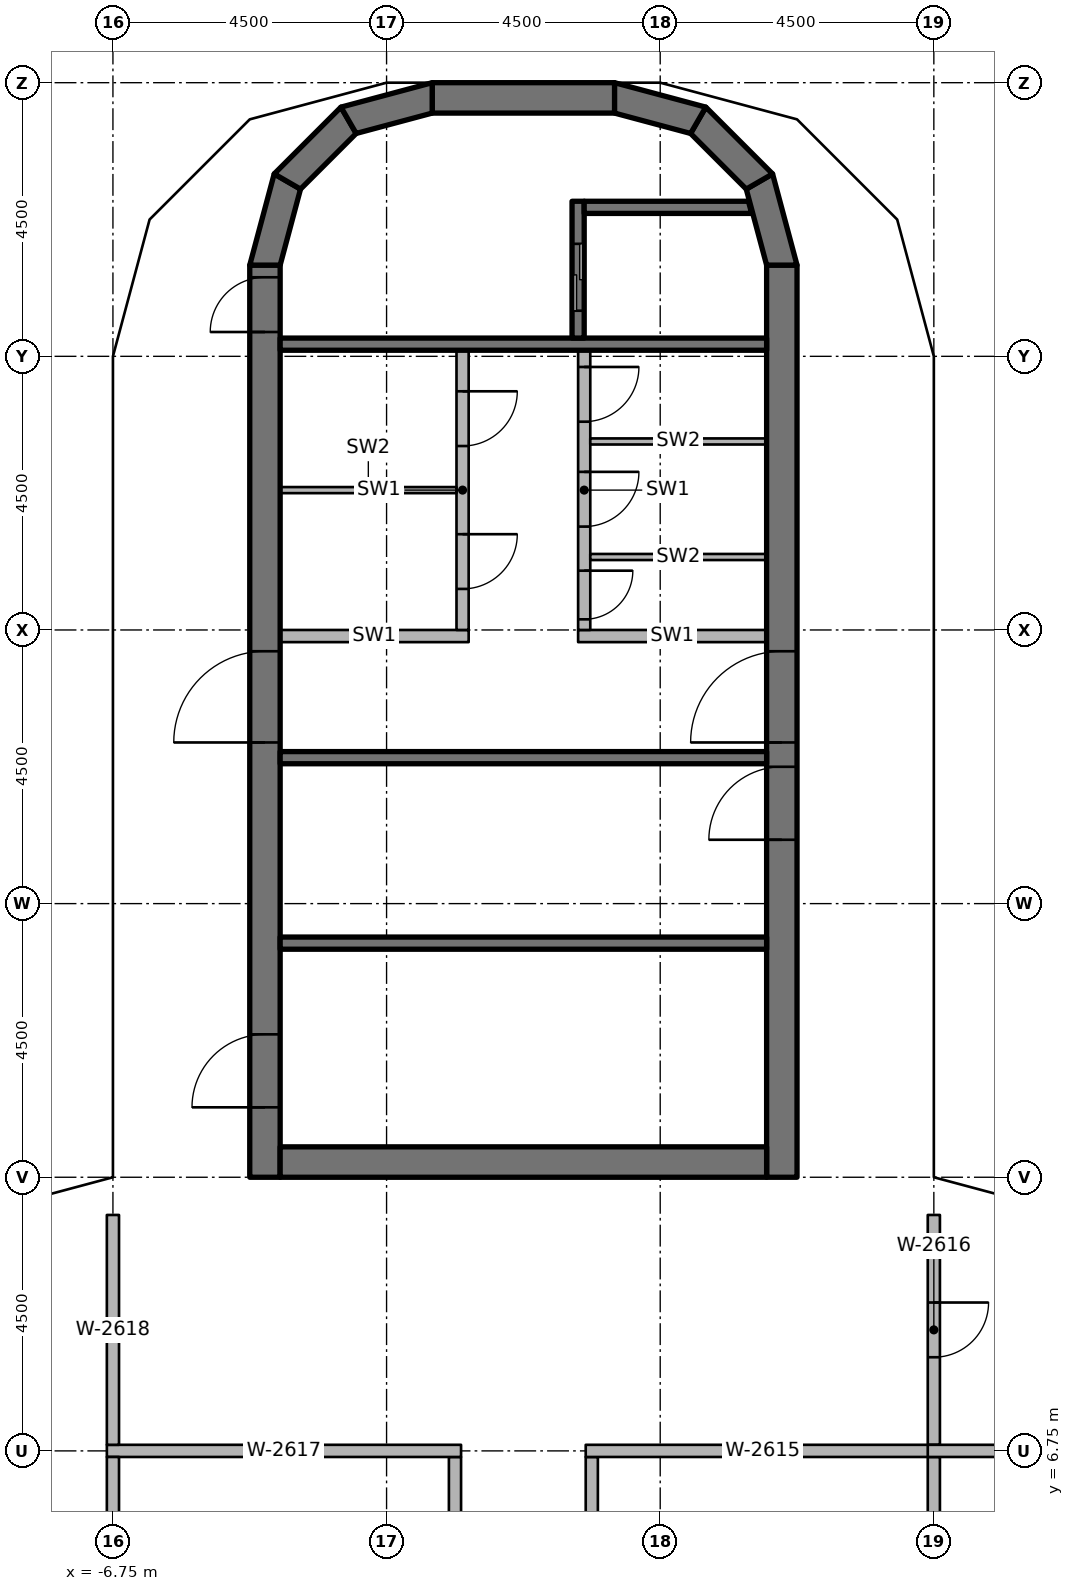
"""IFC4 building model, lengths in metres.
Left out: names, types, materials, properties, quantities, classifications, styles, units other than length and angle.
Written with IfcOpenShell. Run it as: python <this file> out.ifc"""

import sys

from ifc_helpers import new_model, si_unit, direction, frame, frame_2d, origin, origin_2d, place, context, subcontext, project, spatial, polyline, rectangle, outline, extrude, element, fill, save


model = new_model("IFC4")
c1 = context("Model", 3, precision=1e-05, world=origin(), true_north=direction((0.0, 1.0)))
c2 = subcontext(c1, "Body", "Model", "MODEL_VIEW")
j1 = project(units=[si_unit("LENGTHUNIT", "METRE"), si_unit("PLANEANGLEUNIT", "RADIAN")], contexts=[c1])
p1 = place(None, origin())
s1 = spatial("IfcSite", under=j1, at=p1, CompositionType="ELEMENT")
p2 = place(p1, origin())
s2 = spatial("IfcBuilding", under=s1, at=p2, CompositionType="ELEMENT")
p3 = place(p2, frame((0.0, 0.0, 249.8)))
s3 = spatial("IfcBuildingStorey", under=s2, at=p3, CompositionType="ELEMENT", Elevation=249.8)
for number, where, z_axis, x_axis in (
    (1, (-6.25, 6.25, 0.0), (0.0, 0.0, 1.0), (1.0, 0.0, 0.0)),
    (2, (-6.25, 10.75, 0.0), (0.0, 0.0, 1.0), (1.0, 0.0, 0.0)),
    (3, (-6.25, 15.75, 0.0), (0.0, 0.0, 1.0), (1.0, 0.0, 0.0)),
    (4, (-6.25, 20.25, 0.0), (0.0, 0.0, 1.0), (1.0, 0.0, 0.0)),
    (5, (-6.25, 24.65, 0.0), (0.0, 0.0, 1.0), (1.0, 0.0, 0.0)),
    (6, (6.25, 6.25, 0.0), (0.0, 0.0, 1.0), (1.0, 0.0, 0.0)),
    (7, (6.25, 10.75, 0.0), (0.0, 0.0, 1.0), (1.0, 0.0, 0.0)),
    (8, (6.25, 15.75, 0.0), (0.0, 0.0, 1.0), (1.0, 0.0, 0.0)),
    (9, (6.25, 20.25, 0.0), (0.0, 0.0, 1.0), (1.0, 0.0, 0.0)),
    (10, (6.25, 24.65, 0.0), (0.0, 0.0, 1.0), (1.0, 0.0, 0.0)),
):
    element("IfcColumn", number, at=place(p3, frame(where, z_axis=z_axis, x_axis=x_axis)), inside=s3, PredefinedType="COLUMN", context=c2, shape_type="SweptSolid", body=[
        extrude(rectangle(XDim=0.6, YDim=0.6, at=origin_2d()), origin(), (0.0, 0.0, 1.0), 3.65),
    ])
p4 = place(p3, frame((-4.25, 11.25, 0.0), z_axis=(0.0, 0.0, 1.0), x_axis=(0.0, 1.0, 0.0)))
e11 = element("IfcWall", 11, at=p4, inside=s3, PredefinedType="SHEAR", context=c2, shape_type="SweptSolid", body=[
    extrude(rectangle(XDim=15.0, YDim=0.5, at=frame_2d((7.5, 0.0))), origin(), (0.0, 0.0, 1.0), 3.8),
])
p5 = place(p4, frame((7.15, 0.0, 0.0)))
e12 = element("IfcOpeningElement", 12, at=p5, cuts=e11, PredefinedType="OPENING", context=c2, shape_type="SweptSolid", body=[
    extrude(rectangle(XDim=1.5, YDim=2.3, at=frame_2d((0.75, 1.15))), frame((0.0, 0.26, 0.0), z_axis=(0.0, -1.0, 0.0), x_axis=(1.0, 0.0, 0.0)), (0.0, 0.0, 1.0), 0.52),
])
p6 = place(p4, frame((13.9, 0.0, 0.0)))
e13 = element("IfcOpeningElement", 13, at=p6, cuts=e11, PredefinedType="OPENING", context=c2, shape_type="SweptSolid", body=[
    extrude(rectangle(XDim=0.9, YDim=2.1, at=frame_2d((0.45, 1.05))), frame((0.0, 0.26, 0.0), z_axis=(0.0, -1.0, 0.0), x_axis=(1.0, 0.0, 0.0)), (0.0, 0.0, 1.0), 0.52),
])
p7 = place(p4, frame((1.15, 0.0, 0.0)))
e14 = element("IfcOpeningElement", 14, at=p7, cuts=e11, PredefinedType="OPENING", context=c2, shape_type="SweptSolid", body=[
    extrude(rectangle(XDim=1.2, YDim=2.1, at=frame_2d((0.6, 1.05))), frame((0.0, 0.26, 0.0), z_axis=(0.0, -1.0, 0.0), x_axis=(1.0, 0.0, 0.0)), (0.0, 0.0, 1.0), 0.52),
])
p8 = place(p3, frame((4.25, 11.25, 0.0), z_axis=(0.0, 0.0, 1.0), x_axis=(0.0, 1.0, 0.0)))
e15 = element("IfcWall", 15, at=p8, inside=s3, PredefinedType="SHEAR", context=c2, shape_type="SweptSolid", body=[
    extrude(rectangle(XDim=15.0, YDim=0.5, at=frame_2d((7.5, 0.0))), origin(), (0.0, 0.0, 1.0), 3.8),
])
p9 = place(p8, frame((7.15, 0.0, 0.0)))
e16 = element("IfcOpeningElement", 16, at=p9, cuts=e15, PredefinedType="OPENING", context=c2, shape_type="SweptSolid", body=[
    extrude(rectangle(XDim=1.5, YDim=2.3, at=frame_2d((0.75, 1.15))), frame((0.0, 0.26, 0.0), z_axis=(0.0, -1.0, 0.0), x_axis=(1.0, 0.0, 0.0)), (0.0, 0.0, 1.0), 0.52),
])
p10 = place(p8, frame((5.55, 0.0, 0.0)))
e17 = element("IfcOpeningElement", 17, at=p10, cuts=e15, PredefinedType="OPENING", context=c2, shape_type="SweptSolid", body=[
    extrude(rectangle(XDim=1.2, YDim=2.1, at=frame_2d((0.6, 1.05))), frame((0.0, 0.26, 0.0), z_axis=(0.0, -1.0, 0.0), x_axis=(1.0, 0.0, 0.0)), (0.0, 0.0, 1.0), 0.52),
])
p11 = place(p3, frame((-4.0, 11.5, 0.0), z_axis=(0.0, 0.0, 1.0), x_axis=(1.0, 0.0, 0.0)))
e18 = element("IfcWall", 18, at=p11, inside=s3, PredefinedType="SHEAR", context=c2, shape_type="SweptSolid", body=[
    extrude(rectangle(XDim=8.0, YDim=0.5, at=frame_2d((4.0, 0.0))), origin(), (0.0, 0.0, 1.0), 3.8),
])
p12 = place(p3, frame((-1.5, 29.0, 0.0), z_axis=(0.0, 0.0, 1.0), x_axis=(1.0, 0.0, 0.0)))
e19 = element("IfcWall", 19, at=p12, inside=s3, PredefinedType="SHEAR", context=c2, shape_type="SweptSolid", body=[
    extrude(rectangle(XDim=3.0, YDim=0.5, at=frame_2d((1.5, 0.0))), origin(), (0.0, 0.0, 1.0), 3.8),
])
p13 = place(p3, origin())
e20 = element("IfcWall", 20, at=p13, inside=s3, PredefinedType="SHEAR", context=c2, shape_type="SweptSolid", body=[
    extrude(outline(polyline([(-4.5, 26.25), (-4.098, 27.75), (-3.665, 27.5), (-4.0, 26.25), (-4.5, 26.25)])), origin(), (0.0, 0.0, 1.0), 3.8),
])
p14 = place(p3, origin())
e21 = element("IfcWall", 21, at=p14, inside=s3, PredefinedType="SHEAR", context=c2, shape_type="SweptSolid", body=[
    extrude(outline(polyline([(-4.098, 27.75), (-3.0, 28.848), (-2.75, 28.415), (-3.665, 27.5), (-4.098, 27.75)])), origin(), (0.0, 0.0, 1.0), 3.8),
])
p15 = place(p3, origin())
e22 = element("IfcWall", 22, at=p15, inside=s3, PredefinedType="SHEAR", context=c2, shape_type="SweptSolid", body=[
    extrude(outline(polyline([(-3.0, 28.848), (-1.5, 29.25), (-1.5, 28.75), (-2.75, 28.415), (-3.0, 28.848)])), origin(), (0.0, 0.0, 1.0), 3.8),
])
p16 = place(p3, origin())
e23 = element("IfcWall", 23, at=p16, inside=s3, PredefinedType="SHEAR", context=c2, shape_type="SweptSolid", body=[
    extrude(outline(polyline([(4.5, 26.25), (4.098, 27.75), (3.665, 27.5), (4.0, 26.25), (4.5, 26.25)])), origin(), (0.0, 0.0, 1.0), 3.8),
])
p17 = place(p3, origin())
e24 = element("IfcWall", 24, at=p17, inside=s3, PredefinedType="SHEAR", context=c2, shape_type="SweptSolid", body=[
    extrude(outline(polyline([(4.098, 27.75), (3.0, 28.848), (2.75, 28.415), (3.665, 27.5), (4.098, 27.75)])), origin(), (0.0, 0.0, 1.0), 3.8),
])
p18 = place(p3, origin())
e25 = element("IfcWall", 25, at=p18, inside=s3, PredefinedType="SHEAR", context=c2, shape_type="SweptSolid", body=[
    extrude(outline(polyline([(3.0, 28.848), (1.5, 29.25), (1.5, 28.75), (2.75, 28.415), (3.0, 28.848)])), origin(), (0.0, 0.0, 1.0), 3.8),
])
p19 = place(p3, frame((-4.0, 24.95, 0.0), z_axis=(0.0, 0.0, 1.0), x_axis=(1.0, 0.0, 0.0)))
e26 = element("IfcWall", 26, at=p19, inside=s3, PredefinedType="SHEAR", context=c2, shape_type="SweptSolid", body=[
    extrude(rectangle(XDim=8.0, YDim=0.2, at=frame_2d((4.0, 0.0))), origin(), (0.0, 0.0, 1.0), 3.65),
])
p20 = place(p3, frame((0.9, 27.3, 0.0), z_axis=(0.0, 0.0, 1.0), x_axis=(0.0, -1.0, 0.0)))
e27 = element("IfcWall", 27, at=p20, inside=s3, PredefinedType="SHEAR", context=c2, shape_type="SweptSolid", body=[
    extrude(rectangle(XDim=2.25, YDim=0.2, at=frame_2d((1.125, 0.0))), origin(), (0.0, 0.0, 1.0), 3.65),
])
p21 = place(p20, frame((0.7, 0.0, 0.0)))
e28 = element("IfcOpeningElement", 28, at=p21, cuts=e27, PredefinedType="OPENING", context=c2, shape_type="SweptSolid", body=[
    extrude(rectangle(XDim=1.1, YDim=2.3, at=frame_2d((0.55, 1.15))), frame((0.0, 0.11, 0.0), z_axis=(0.0, -1.0, 0.0), x_axis=(1.0, 0.0, 0.0)), (0.0, 0.0, 1.0), 0.22),
])
p22 = place(p3, origin())
e29 = element("IfcWall", 29, at=p22, inside=s3, PredefinedType="SHEAR", context=c2, shape_type="SweptSolid", body=[
    extrude(outline(polyline([(1.0, 27.1), (3.755, 27.1), (3.701, 27.3), (1.0, 27.3), (1.0, 27.1)])), origin(), (0.0, 0.0, 1.0), 3.65),
])
for number, where, z_axis, x_axis in (
    (30, (-4.0, 18.15, 0.0), (0.0, 0.0, 1.0), (1.0, 0.0, 0.0)),
    (31, (-4.0, 15.1, 0.0), (0.0, 0.0, 1.0), (1.0, 0.0, 0.0)),
):
    element("IfcWall", number, at=place(p3, frame(where, z_axis=z_axis, x_axis=x_axis)), inside=s3, PredefinedType="SHEAR", context=c2, shape_type="SweptSolid", body=[
        extrude(rectangle(XDim=8.0, YDim=0.2, at=frame_2d((4.0, 0.0))), origin(), (0.0, 0.0, 1.0), 3.65),
    ])
p23 = place(p3, frame((-4.0, 20.15, 0.0), z_axis=(0.0, 0.0, 1.0), x_axis=(1.0, 0.0, 0.0)))
e32 = element("IfcWall", 32, at=p23, inside=s3, PredefinedType="PARTITIONING", context=c2, shape_type="SweptSolid", body=[
    extrude(rectangle(XDim=3.1, YDim=0.2, at=frame_2d((1.55, 0.0))), origin(), (0.0, 0.0, 1.0), 3.65),
])
p24 = place(p3, frame((-1.0, 24.85, 0.0), z_axis=(0.0, 0.0, 1.0), x_axis=(0.0, -1.0, 0.0)))
e33 = element("IfcWall", 33, at=p24, inside=s3, PredefinedType="PARTITIONING", context=c2, shape_type="SweptSolid", body=[
    extrude(rectangle(XDim=4.6, YDim=0.2, at=frame_2d((2.3, 0.0))), origin(), (0.0, 0.0, 1.0), 3.65),
])
p25 = place(p24, frame((0.675, 0.0, 0.0)))
e34 = element("IfcOpeningElement", 34, at=p25, cuts=e33, PredefinedType="OPENING", context=c2, shape_type="SweptSolid", body=[
    extrude(rectangle(XDim=0.9, YDim=2.1, at=frame_2d((0.45, 1.05))), frame((0.0, 0.11, 0.0), z_axis=(0.0, -1.0, 0.0), x_axis=(1.0, 0.0, 0.0)), (0.0, 0.0, 1.0), 0.22),
])
p26 = place(p24, frame((3.025, 0.0, 0.0)))
e35 = element("IfcOpeningElement", 35, at=p26, cuts=e33, PredefinedType="OPENING", context=c2, shape_type="SweptSolid", body=[
    extrude(rectangle(XDim=0.9, YDim=2.1, at=frame_2d((0.45, 1.05))), frame((0.0, 0.11, 0.0), z_axis=(0.0, -1.0, 0.0), x_axis=(1.0, 0.0, 0.0)), (0.0, 0.0, 1.0), 0.22),
])
p27 = place(p3, frame((0.9, 20.15, 0.0), z_axis=(0.0, 0.0, 1.0), x_axis=(1.0, 0.0, 0.0)))
e36 = element("IfcWall", 36, at=p27, inside=s3, PredefinedType="PARTITIONING", context=c2, shape_type="SweptSolid", body=[
    extrude(rectangle(XDim=3.1, YDim=0.2, at=frame_2d((1.55, 0.0))), origin(), (0.0, 0.0, 1.0), 3.65),
])
p28 = place(p3, frame((1.0, 24.85, 0.0), z_axis=(0.0, 0.0, 1.0), x_axis=(0.0, -1.0, 0.0)))
e37 = element("IfcWall", 37, at=p28, inside=s3, PredefinedType="PARTITIONING", context=c2, shape_type="SweptSolid", body=[
    extrude(rectangle(XDim=4.6, YDim=0.2, at=frame_2d((2.3, 0.0))), origin(), (0.0, 0.0, 1.0), 3.65),
])
p29 = place(p28, frame((0.275, 0.0, 0.0)))
e38 = element("IfcOpeningElement", 38, at=p29, cuts=e37, PredefinedType="OPENING", context=c2, shape_type="SweptSolid", body=[
    extrude(rectangle(XDim=0.9, YDim=2.1, at=frame_2d((0.45, 1.05))), frame((0.0, 0.11, 0.0), z_axis=(0.0, -1.0, 0.0), x_axis=(1.0, 0.0, 0.0)), (0.0, 0.0, 1.0), 0.22),
])
p30 = place(p28, frame((2.0, 0.0, 0.0)))
e39 = element("IfcOpeningElement", 39, at=p30, cuts=e37, PredefinedType="OPENING", context=c2, shape_type="SweptSolid", body=[
    extrude(rectangle(XDim=0.9, YDim=2.1, at=frame_2d((0.45, 1.05))), frame((0.0, 0.11, 0.0), z_axis=(0.0, -1.0, 0.0), x_axis=(1.0, 0.0, 0.0)), (0.0, 0.0, 1.0), 0.22),
])
p31 = place(p28, frame((3.625, 0.0, 0.0)))
e40 = element("IfcOpeningElement", 40, at=p31, cuts=e37, PredefinedType="OPENING", context=c2, shape_type="SweptSolid", body=[
    extrude(rectangle(XDim=0.8, YDim=2.1, at=frame_2d((0.4, 1.05))), frame((0.0, 0.11, 0.0), z_axis=(0.0, -1.0, 0.0), x_axis=(1.0, 0.0, 0.0)), (0.0, 0.0, 1.0), 0.22),
])
for number, where, z_axis, x_axis in (
    (41, (-4.0, 22.55, 0.0), (0.0, 0.0, 1.0), (1.0, 0.0, 0.0)),
    (42, (1.1, 23.35, 0.0), (0.0, 0.0, 1.0), (1.0, 0.0, 0.0)),
    (43, (1.1, 21.45, 0.0), (0.0, 0.0, 1.0), (1.0, 0.0, 0.0)),
):
    element("IfcWall", number, at=place(p3, frame(where, z_axis=z_axis, x_axis=x_axis)), inside=s3, PredefinedType="PARTITIONING", context=c2, shape_type="SweptSolid", body=[
        extrude(rectangle(XDim=2.9, YDim=0.1, at=frame_2d((1.45, 0.0))), origin(), (0.0, 0.0, 1.0), 3.65),
    ])
for number, where, z_axis, x_axis in (
    (44, (1.125, 1.225, 0.0), (0.0, 0.0, 1.0), (0.0, 1.0, 0.0)),
    (45, (-1.125, 1.225, 0.0), (0.0, 0.0, 1.0), (0.0, 1.0, 0.0)),
):
    element("IfcWall", number, at=place(p3, frame(where, z_axis=z_axis, x_axis=x_axis)), inside=s3, PredefinedType="PARTITIONING", context=c2, shape_type="SweptSolid", body=[
        extrude(rectangle(XDim=5.425, YDim=0.2, at=frame_2d((2.712, 0.0))), origin(), (0.0, 0.0, 1.0), 2.75),
    ])
p32 = place(p3, frame((1.025, 6.75, 0.0), z_axis=(0.0, 0.0, 1.0), x_axis=(1.0, 0.0, 0.0)))
e46 = element("IfcWall", 46, at=p32, inside=s3, PredefinedType="PARTITIONING", context=c2, shape_type="SweptSolid", body=[
    extrude(rectangle(XDim=5.825, YDim=0.2, at=frame_2d((2.913, 0.0))), origin(), (0.0, 0.0, 1.0), 2.75),
])
p33 = place(p3, frame((6.75, 10.63, 0.0), z_axis=(0.0, 0.0, 1.0), x_axis=(0.0, -1.0, 0.0)))
e47 = element("IfcWall", 47, at=p33, inside=s3, PredefinedType="PARTITIONING", context=c2, shape_type="SweptSolid", body=[
    extrude(rectangle(XDim=3.78, YDim=0.2, at=frame_2d((1.89, 0.0))), origin(), (0.0, 0.0, 1.0), 2.75),
])
p34 = place(p33, frame((1.44, 0.0, 0.0)))
e48 = element("IfcOpeningElement", 48, at=p34, cuts=e47, PredefinedType="OPENING", context=c2, shape_type="SweptSolid", body=[
    extrude(rectangle(XDim=0.9, YDim=2.1, at=frame_2d((0.45, 1.05))), frame((0.0, 0.11, 0.0), z_axis=(0.0, -1.0, 0.0), x_axis=(1.0, 0.0, 0.0)), (0.0, 0.0, 1.0), 0.22),
])
p35 = place(p3, frame((-6.85, 6.75, 0.0), z_axis=(0.0, 0.0, 1.0), x_axis=(1.0, 0.0, 0.0)))
e49 = element("IfcWall", 49, at=p35, inside=s3, PredefinedType="PARTITIONING", context=c2, shape_type="SweptSolid", body=[
    extrude(rectangle(XDim=5.825, YDim=0.2, at=frame_2d((2.913, 0.0))), origin(), (0.0, 0.0, 1.0), 2.75),
])
p36 = place(p3, frame((-6.75, 6.85, 0.0), z_axis=(0.0, 0.0, 1.0), x_axis=(0.0, 1.0, 0.0)))
e50 = element("IfcWall", 50, at=p36, inside=s3, PredefinedType="PARTITIONING", context=c2, shape_type="SweptSolid", body=[
    extrude(rectangle(XDim=3.78, YDim=0.2, at=frame_2d((1.89, 0.0))), origin(), (0.0, 0.0, 1.0), 2.75),
])
p37 = place(p3, frame((6.75, 1.225, 0.0), z_axis=(0.0, 0.0, 1.0), x_axis=(0.0, 1.0, 0.0)))
e51 = element("IfcWall", 51, at=p37, inside=s3, PredefinedType="PARTITIONING", context=c2, shape_type="SweptSolid", body=[
    extrude(rectangle(XDim=5.425, YDim=0.2, at=frame_2d((2.712, 0.0))), origin(), (0.0, 0.0, 1.0), 2.75),
])
p38 = place(p3, frame((6.65, 6.75, 0.0), z_axis=(0.0, 0.0, 1.0), x_axis=(1.0, 0.0, 0.0)))
e52 = element("IfcWall", 52, at=p38, inside=s3, PredefinedType="PARTITIONING", context=c2, shape_type="SweptSolid", body=[
    extrude(rectangle(XDim=4.7, YDim=0.2, at=frame_2d((2.35, 0.0))), origin(), (0.0, 0.0, 1.0), 2.75),
])
p39 = place(p3, frame((-6.75, 1.225, 0.0), z_axis=(0.0, 0.0, 1.0), x_axis=(0.0, 1.0, 0.0)))
e53 = element("IfcWall", 53, at=p39, inside=s3, PredefinedType="PARTITIONING", context=c2, shape_type="SweptSolid", body=[
    extrude(rectangle(XDim=5.425, YDim=0.2, at=frame_2d((2.712, 0.0))), origin(), (0.0, 0.0, 1.0), 2.75),
])
p40 = place(p5, origin())
e54 = element("IfcDoor", 54, at=p40, inside=s3, OperationType="DOUBLE_DOOR_SINGLE_SWING", PredefinedType="DOOR", context=c2, shape_type="SweptSolid", body=[
    extrude(rectangle(XDim=1.5, YDim=2.3, at=frame_2d((0.75, 1.15))), frame((0.0, 0.025, 0.0), z_axis=(0.0, -1.0, 0.0), x_axis=(1.0, 0.0, 0.0)), (0.0, 0.0, 1.0), 0.05),
])
fill(e12, e54)
p41 = place(p9, origin())
e55 = element("IfcDoor", 55, at=p41, inside=s3, OperationType="DOUBLE_DOOR_SINGLE_SWING", PredefinedType="DOOR", context=c2, shape_type="SweptSolid", body=[
    extrude(rectangle(XDim=1.5, YDim=2.3, at=frame_2d((0.75, 1.15))), frame((0.0, 0.025, 0.0), z_axis=(0.0, -1.0, 0.0), x_axis=(1.0, 0.0, 0.0)), (0.0, 0.0, 1.0), 0.05),
])
fill(e16, e55)
p42 = place(p6, origin())
e56 = element("IfcDoor", 56, at=p42, inside=s3, OperationType="SINGLE_SWING_LEFT", PredefinedType="DOOR", context=c2, shape_type="SweptSolid", body=[
    extrude(rectangle(XDim=0.9, YDim=2.1, at=frame_2d((0.45, 1.05))), frame((0.0, 0.025, 0.0), z_axis=(0.0, -1.0, 0.0), x_axis=(1.0, 0.0, 0.0)), (0.0, 0.0, 1.0), 0.05),
])
fill(e13, e56)
p43 = place(p10, origin())
e57 = element("IfcDoor", 57, at=p43, inside=s3, OperationType="SINGLE_SWING_LEFT", PredefinedType="DOOR", context=c2, shape_type="SweptSolid", body=[
    extrude(rectangle(XDim=1.2, YDim=2.1, at=frame_2d((0.6, 1.05))), frame((0.0, 0.025, 0.0), z_axis=(0.0, -1.0, 0.0), x_axis=(1.0, 0.0, 0.0)), (0.0, 0.0, 1.0), 0.05),
])
fill(e17, e57)
p44 = place(p7, origin())
e58 = element("IfcDoor", 58, at=p44, inside=s3, OperationType="SINGLE_SWING_RIGHT", PredefinedType="DOOR", context=c2, shape_type="SweptSolid", body=[
    extrude(rectangle(XDim=1.2, YDim=2.1, at=frame_2d((0.6, 1.05))), frame((0.0, 0.025, 0.0), z_axis=(0.0, -1.0, 0.0), x_axis=(1.0, 0.0, 0.0)), (0.0, 0.0, 1.0), 0.05),
])
fill(e14, e58)
p45 = place(p21, origin())
e59 = element("IfcDoor", 59, at=p45, inside=s3, OperationType="DOUBLE_DOOR_SLIDING", PredefinedType="DOOR", context=c2, shape_type="SweptSolid", body=[
    extrude(rectangle(XDim=1.1, YDim=2.3, at=frame_2d((0.55, 1.15))), frame((0.0, 0.025, 0.0), z_axis=(0.0, -1.0, 0.0), x_axis=(1.0, 0.0, 0.0)), (0.0, 0.0, 1.0), 0.05),
])
fill(e28, e59)
p46 = place(p25, origin())
e60 = element("IfcDoor", 60, at=p46, inside=s3, OperationType="SINGLE_SWING_LEFT", PredefinedType="DOOR", context=c2, shape_type="SweptSolid", body=[
    extrude(rectangle(XDim=0.9, YDim=2.1, at=frame_2d((0.45, 1.05))), frame((0.0, 0.025, 0.0), z_axis=(0.0, -1.0, 0.0), x_axis=(1.0, 0.0, 0.0)), (0.0, 0.0, 1.0), 0.05),
])
fill(e34, e60)
p47 = place(p26, origin())
e61 = element("IfcDoor", 61, at=p47, inside=s3, OperationType="SINGLE_SWING_RIGHT", PredefinedType="DOOR", context=c2, shape_type="SweptSolid", body=[
    extrude(rectangle(XDim=0.9, YDim=2.1, at=frame_2d((0.45, 1.05))), frame((0.0, 0.025, 0.0), z_axis=(0.0, -1.0, 0.0), x_axis=(1.0, 0.0, 0.0)), (0.0, 0.0, 1.0), 0.05),
])
fill(e35, e61)
p48 = place(p29, origin())
e62 = element("IfcDoor", 62, at=p48, inside=s3, OperationType="SINGLE_SWING_RIGHT", PredefinedType="DOOR", context=c2, shape_type="SweptSolid", body=[
    extrude(rectangle(XDim=0.9, YDim=2.1, at=frame_2d((0.45, 1.05))), frame((0.0, 0.025, 0.0), z_axis=(0.0, -1.0, 0.0), x_axis=(1.0, 0.0, 0.0)), (0.0, 0.0, 1.0), 0.05),
])
fill(e38, e62)
p49 = place(p30, origin())
e63 = element("IfcDoor", 63, at=p49, inside=s3, OperationType="SINGLE_SWING_RIGHT", PredefinedType="DOOR", context=c2, shape_type="SweptSolid", body=[
    extrude(rectangle(XDim=0.9, YDim=2.1, at=frame_2d((0.45, 1.05))), frame((0.0, 0.025, 0.0), z_axis=(0.0, -1.0, 0.0), x_axis=(1.0, 0.0, 0.0)), (0.0, 0.0, 1.0), 0.05),
])
fill(e39, e63)
p50 = place(p31, origin())
e64 = element("IfcDoor", 64, at=p50, inside=s3, OperationType="SINGLE_SWING_RIGHT", PredefinedType="DOOR", context=c2, shape_type="SweptSolid", body=[
    extrude(rectangle(XDim=0.8, YDim=2.1, at=frame_2d((0.4, 1.05))), frame((0.0, 0.025, 0.0), z_axis=(0.0, -1.0, 0.0), x_axis=(1.0, 0.0, 0.0)), (0.0, 0.0, 1.0), 0.05),
])
fill(e40, e64)
p51 = place(p34, origin())
e65 = element("IfcDoor", 65, at=p51, inside=s3, OperationType="SINGLE_SWING_RIGHT", PredefinedType="DOOR", context=c2, shape_type="SweptSolid", body=[
    extrude(rectangle(XDim=0.9, YDim=2.1, at=frame_2d((0.45, 1.05))), frame((0.0, 0.025, 0.0), z_axis=(0.0, -1.0, 0.0), x_axis=(1.0, 0.0, 0.0)), (0.0, 0.0, 1.0), 0.05),
])
fill(e48, e65)
save(model, sys.argv[1])
